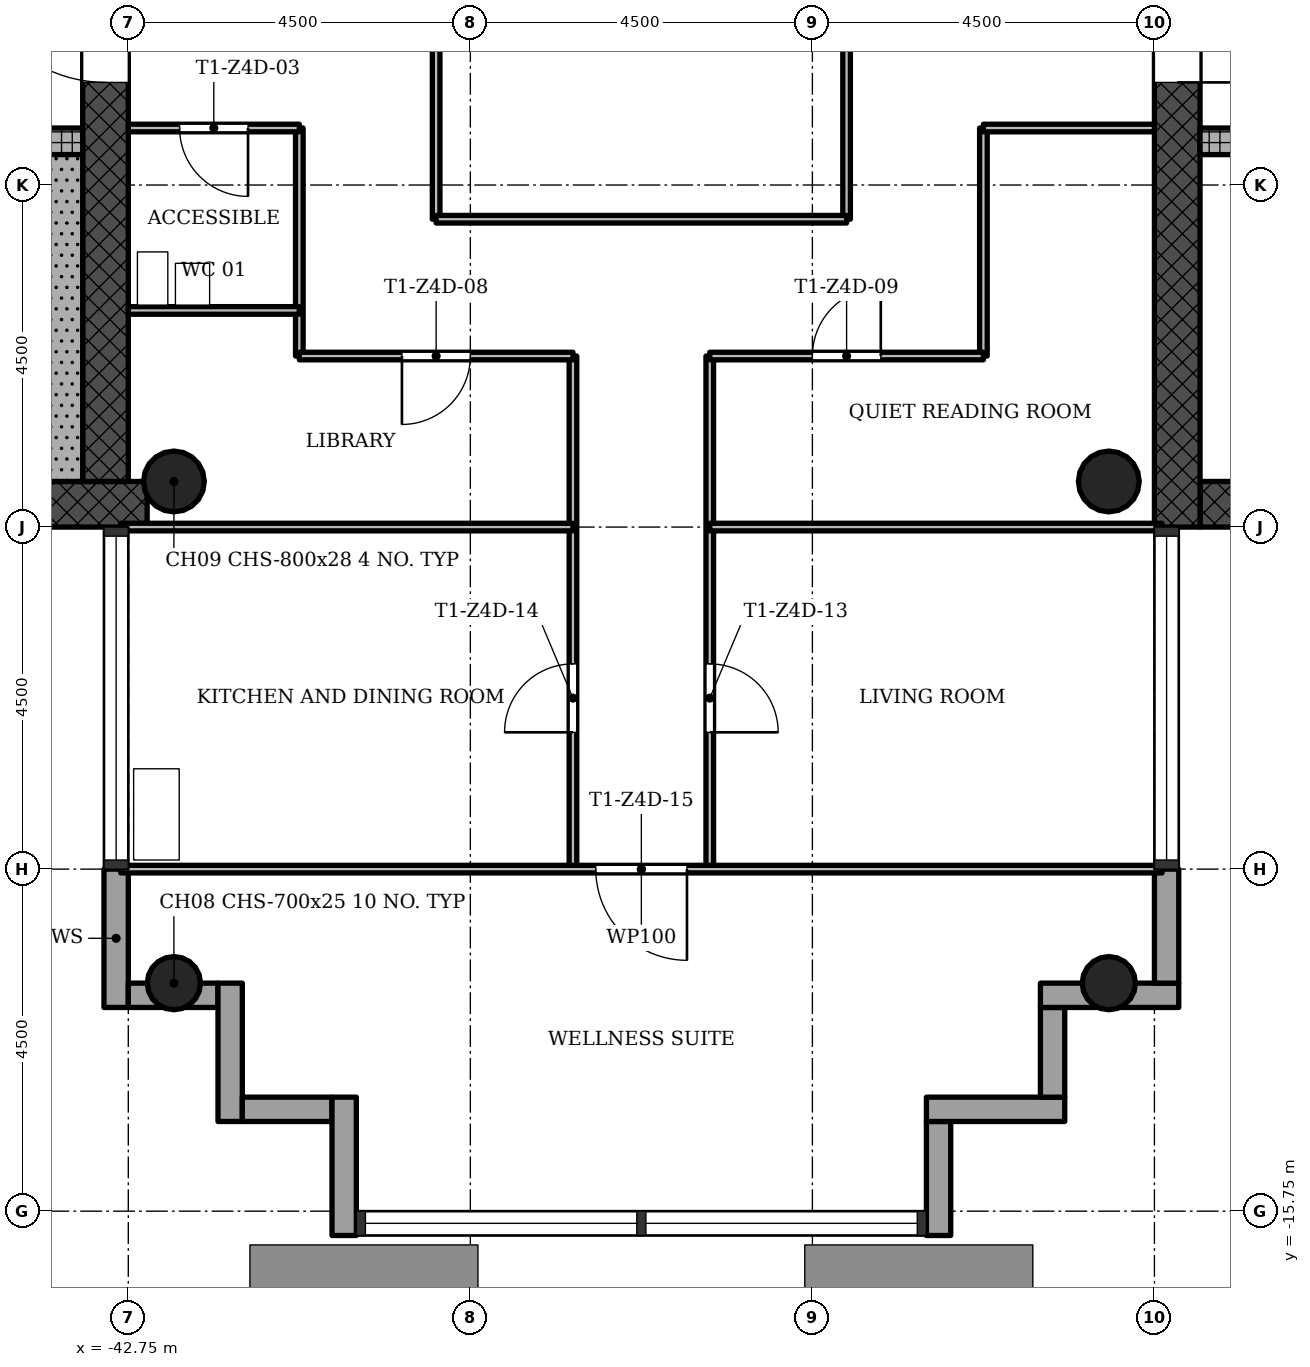
"""IFC4 building model, lengths in metres.
Left out: names, types, materials, properties, quantities, classifications, styles, units other than length and angle.
Written with IfcOpenShell. Run it as: python <this file> out.ifc"""

import sys

from ifc_helpers import new_model, si_unit, direction, frame, frame_2d, origin, origin_2d, place, context, subcontext, project, spatial, rectangle, hollow_circle, extrude, element, fill, save


model = new_model("IFC4")
c1 = context("Model", 3, precision=1e-05, world=origin(), true_north=direction((0.0, 1.0)))
c2 = subcontext(c1, "Body", "Model", "MODEL_VIEW")
j1 = project(units=[si_unit("LENGTHUNIT", "METRE"), si_unit("PLANEANGLEUNIT", "RADIAN")], contexts=[c1])
p1 = place(None, origin())
s1 = spatial("IfcSite", under=j1, at=p1, CompositionType="ELEMENT")
p2 = place(p1, origin())
s2 = spatial("IfcBuilding", under=s1, at=p2, CompositionType="ELEMENT")
p3 = place(p2, frame((0.0, 0.0, 202.8)))
s3 = spatial("IfcBuildingStorey", under=s2, at=p3, CompositionType="ELEMENT", Elevation=202.8)
p4 = place(p3, frame((-28.65, -6.45, 0.0), z_axis=(0.0, 0.0, 1.0), x_axis=(1.0, 0.0, 0.0)))
e1 = element("IfcWall", 1, at=p4, inside=s3, PredefinedType="SHEAR", context=c2, shape_type="SweptSolid", body=[
    extrude(rectangle(XDim=8.4, YDim=0.6, at=frame_2d((4.2, 0.0))), origin(), (0.0, 0.0, 1.0), 3.4),
])
p5 = place(p3, frame((-28.95, 6.15, 0.0), z_axis=(0.0, 0.0, 1.0), x_axis=(0.0, -1.0, 0.0)))
e2 = element("IfcWall", 2, at=p5, inside=s3, PredefinedType="SHEAR", context=c2, shape_type="SweptSolid", body=[
    extrude(rectangle(XDim=12.9, YDim=0.6, at=frame_2d((6.45, 0.0))), origin(), (0.0, 0.0, 1.0), 3.4),
])
p6 = place(p5, frame((5.25, 0.0, 0.0)))
e3 = element("IfcOpeningElement", 3, at=p6, cuts=e2, PredefinedType="OPENING", context=c2, shape_type="SweptSolid", body=[
    extrude(rectangle(XDim=1.8, YDim=2.1, at=frame_2d((0.9, 1.05))), frame((0.0, 0.31, 0.0), z_axis=(0.0, -1.0, 0.0), x_axis=(1.0, 0.0, 0.0)), (0.0, 0.0, 1.0), 0.62),
])
p7 = place(p3, frame((-28.65, -1.675, 0.0), z_axis=(0.0, 0.0, 1.0), x_axis=(1.0, 0.0, 0.0)))
e4 = element("IfcWall", 4, at=p7, inside=s3, PredefinedType="SHEAR", context=c2, shape_type="SweptSolid", body=[
    extrude(rectangle(XDim=7.8, YDim=0.35, at=frame_2d((3.9, 0.0))), origin(), (0.0, 0.0, 1.0), 3.4),
])
p8 = place(p7, frame((1.15, 0.0, 0.0)))
e5 = element("IfcOpeningElement", 5, at=p8, cuts=e4, PredefinedType="OPENING", context=c2, shape_type="SweptSolid", body=[
    extrude(rectangle(XDim=1.1, YDim=2.1, at=frame_2d((0.55, 1.05))), frame((0.0, 0.185, 0.0), z_axis=(0.0, -1.0, 0.0), x_axis=(1.0, 0.0, 0.0)), (0.0, 0.0, 1.0), 0.37),
])
p9 = place(p7, frame((3.35, 0.0, 0.0)))
e6 = element("IfcOpeningElement", 6, at=p9, cuts=e4, PredefinedType="OPENING", context=c2, shape_type="SweptSolid", body=[
    extrude(rectangle(XDim=1.1, YDim=2.1, at=frame_2d((0.55, 1.05))), frame((0.0, 0.185, 0.0), z_axis=(0.0, -1.0, 0.0), x_axis=(1.0, 0.0, 0.0)), (0.0, 0.0, 1.0), 0.37),
])
p10 = place(p7, frame((5.55, 0.0, 0.0)))
e7 = element("IfcOpeningElement", 7, at=p10, cuts=e4, PredefinedType="OPENING", context=c2, shape_type="SweptSolid", body=[
    extrude(rectangle(XDim=1.1, YDim=2.1, at=frame_2d((0.55, 1.05))), frame((0.0, 0.185, 0.0), z_axis=(0.0, -1.0, 0.0), x_axis=(1.0, 0.0, 0.0)), (0.0, 0.0, 1.0), 0.37),
])
p11 = place(p3, frame((-51.15, -6.45, 0.0), z_axis=(0.0, 0.0, 1.0), x_axis=(1.0, 0.0, 0.0)))
e8 = element("IfcWall", 8, at=p11, inside=s3, PredefinedType="SHEAR", context=c2, shape_type="SweptSolid", body=[
    extrude(rectangle(XDim=8.648, YDim=0.6, at=frame_2d((4.324, 0.0))), origin(), (0.0, 0.0, 1.0), 3.4),
])
p12 = place(p3, frame((-43.05, -6.15, 0.0), z_axis=(0.0, 0.0, 1.0), x_axis=(0.0, 1.0, 0.0)))
e9 = element("IfcWall", 9, at=p12, inside=s3, PredefinedType="SHEAR", context=c2, shape_type="SweptSolid", body=[
    extrude(rectangle(XDim=12.9, YDim=0.6, at=frame_2d((6.45, 0.0))), origin(), (0.0, 0.0, 1.0), 3.4),
])
p13 = place(p12, frame((5.25, 0.0, 0.0)))
e10 = element("IfcOpeningElement", 10, at=p13, cuts=e9, PredefinedType="OPENING", context=c2, shape_type="SweptSolid", body=[
    extrude(rectangle(XDim=1.8, YDim=2.1, at=frame_2d((0.9, 1.05))), frame((0.0, 0.31, 0.0), z_axis=(0.0, -1.0, 0.0), x_axis=(1.0, 0.0, 0.0)), (0.0, 0.0, 1.0), 0.62),
])
p14 = place(p3, frame((-51.15, -1.675, 0.0), z_axis=(0.0, 0.0, 1.0), x_axis=(1.0, 0.0, 0.0)))
e11 = element("IfcWall", 11, at=p14, inside=s3, PredefinedType="SHEAR", context=c2, shape_type="SweptSolid", body=[
    extrude(rectangle(XDim=7.8, YDim=0.35, at=frame_2d((3.9, 0.0))), origin(), (0.0, 0.0, 1.0), 3.4),
])
p15 = place(p14, frame((5.85, 0.0, 0.0)))
e12 = element("IfcOpeningElement", 12, at=p15, cuts=e11, PredefinedType="OPENING", context=c2, shape_type="SweptSolid", body=[
    extrude(rectangle(XDim=0.9, YDim=2.1, at=frame_2d((0.45, 1.05))), frame((0.0, 0.185, 0.0), z_axis=(0.0, -1.0, 0.0), x_axis=(1.0, 0.0, 0.0)), (0.0, 0.0, 1.0), 0.37),
])
for number, where, z_axis, x_axis in (
    (13, (-42.15, -12.75, 0.0), (0.0, 0.0, 1.0), (1.0, 0.0, 0.0)),
    (14, (-29.85, -12.75, 0.0), (0.0, 0.0, 1.0), (1.0, 0.0, 0.0)),
):
    element("IfcColumn", number, at=place(p3, frame(where, z_axis=z_axis, x_axis=x_axis)), inside=s3, PredefinedType="COLUMN", context=c2, shape_type="SweptSolid", body=[
        extrude(hollow_circle(Radius=0.35, WallThickness=0.025, at=origin_2d()), origin(), (0.0, 0.0, 1.0), 3.4),
    ])
for number, where, z_axis, x_axis in (
    (15, (-42.15, -6.15, 0.0), (0.0, 0.0, 1.0), (1.0, 0.0, 0.0)),
    (16, (-29.85, -6.15, 0.0), (0.0, 0.0, 1.0), (1.0, 0.0, 0.0)),
):
    element("IfcColumn", number, at=place(p3, frame(where, z_axis=z_axis, x_axis=x_axis)), inside=s3, PredefinedType="COLUMN", context=c2, shape_type="SweptSolid", body=[
        extrude(hollow_circle(Radius=0.4, WallThickness=0.028, at=origin_2d()), origin(), (0.0, 0.0, 1.0), 3.4),
    ])
p16 = place(p3, frame((-42.91, -11.25, -0.3), z_axis=(0.0, 0.0, 1.0), x_axis=(0.0, -1.0, 0.0)))
e17 = element("IfcWall", 17, at=p16, inside=s3, PredefinedType="STANDARD", context=c2, shape_type="SweptSolid", body=[
    extrude(rectangle(XDim=1.82, YDim=0.32, at=frame_2d((0.91, 0.0))), origin(), (0.0, 0.0, 1.0), 3.4),
])
p17 = place(p3, frame((-42.75, -12.91, -0.3), z_axis=(0.0, 0.0, 1.0), x_axis=(1.0, 0.0, 0.0)))
e18 = element("IfcWall", 18, at=p17, inside=s3, PredefinedType="STANDARD", context=c2, shape_type="SweptSolid", body=[
    extrude(rectangle(XDim=1.18, YDim=0.32, at=frame_2d((0.59, 0.0))), origin(), (0.0, 0.0, 1.0), 3.4),
])
p18 = place(p3, frame((-41.41, -12.75, -0.3), z_axis=(0.0, 0.0, 1.0), x_axis=(0.0, -1.0, 0.0)))
e19 = element("IfcWall", 19, at=p18, inside=s3, PredefinedType="STANDARD", context=c2, shape_type="SweptSolid", body=[
    extrude(rectangle(XDim=1.82, YDim=0.32, at=frame_2d((0.91, 0.0))), origin(), (0.0, 0.0, 1.0), 3.4),
])
p19 = place(p3, frame((-41.25, -14.41, -0.3), z_axis=(0.0, 0.0, 1.0), x_axis=(1.0, 0.0, 0.0)))
e20 = element("IfcWall", 20, at=p19, inside=s3, PredefinedType="STANDARD", context=c2, shape_type="SweptSolid", body=[
    extrude(rectangle(XDim=1.18, YDim=0.32, at=frame_2d((0.59, 0.0))), origin(), (0.0, 0.0, 1.0), 3.4),
])
p20 = place(p3, frame((-39.91, -14.25, -0.3), z_axis=(0.0, 0.0, 1.0), x_axis=(0.0, -1.0, 0.0)))
e21 = element("IfcWall", 21, at=p20, inside=s3, PredefinedType="STANDARD", context=c2, shape_type="SweptSolid", body=[
    extrude(rectangle(XDim=1.82, YDim=0.32, at=frame_2d((0.91, 0.0))), origin(), (0.0, 0.0, 1.0), 3.4),
])
p21 = place(p3, frame((-32.09, -16.07, -0.3), z_axis=(0.0, 0.0, 1.0), x_axis=(0.0, 1.0, 0.0)))
e22 = element("IfcWall", 22, at=p21, inside=s3, PredefinedType="STANDARD", context=c2, shape_type="SweptSolid", body=[
    extrude(rectangle(XDim=1.5, YDim=0.32, at=frame_2d((0.75, 0.0))), origin(), (0.0, 0.0, 1.0), 3.4),
])
p22 = place(p3, frame((-32.25, -14.41, -0.3), z_axis=(0.0, 0.0, 1.0), x_axis=(1.0, 0.0, 0.0)))
e23 = element("IfcWall", 23, at=p22, inside=s3, PredefinedType="STANDARD", context=c2, shape_type="SweptSolid", body=[
    extrude(rectangle(XDim=1.82, YDim=0.32, at=frame_2d((0.91, 0.0))), origin(), (0.0, 0.0, 1.0), 3.4),
])
p23 = place(p3, frame((-30.59, -14.25, -0.3), z_axis=(0.0, 0.0, 1.0), x_axis=(0.0, 1.0, 0.0)))
e24 = element("IfcWall", 24, at=p23, inside=s3, PredefinedType="STANDARD", context=c2, shape_type="SweptSolid", body=[
    extrude(rectangle(XDim=1.18, YDim=0.32, at=frame_2d((0.59, 0.0))), origin(), (0.0, 0.0, 1.0), 3.4),
])
p24 = place(p3, frame((-30.75, -12.91, -0.3), z_axis=(0.0, 0.0, 1.0), x_axis=(1.0, 0.0, 0.0)))
e25 = element("IfcWall", 25, at=p24, inside=s3, PredefinedType="STANDARD", context=c2, shape_type="SweptSolid", body=[
    extrude(rectangle(XDim=1.82, YDim=0.32, at=frame_2d((0.91, 0.0))), origin(), (0.0, 0.0, 1.0), 3.4),
])
p25 = place(p3, frame((-29.09, -12.75, -0.3), z_axis=(0.0, 0.0, 1.0), x_axis=(0.0, 1.0, 0.0)))
e26 = element("IfcWall", 26, at=p25, inside=s3, PredefinedType="STANDARD", context=c2, shape_type="SweptSolid", body=[
    extrude(rectangle(XDim=1.5, YDim=0.32, at=frame_2d((0.75, 0.0))), origin(), (0.0, 0.0, 1.0), 3.4),
])
p26 = place(p3, frame((-40.5, -4.5, 0.0), z_axis=(0.0, 0.0, 1.0), x_axis=(0.0, 1.0, 0.0)))
e27 = element("IfcWall", 27, at=p26, inside=s3, PredefinedType="PARTITIONING", context=c2, shape_type="SweptSolid", body=[
    extrude(rectangle(XDim=3.0, YDim=0.1, at=frame_2d((1.5, 0.0))), origin(), (0.0, 0.0, 1.0), 3.0),
])
p27 = place(p3, frame((-38.7, -2.7, 0.0), z_axis=(0.0, 0.0, 1.0), x_axis=(0.0, 1.0, 0.0)))
e28 = element("IfcWall", 28, at=p27, inside=s3, PredefinedType="PARTITIONING", context=c2, shape_type="SweptSolid", body=[
    extrude(rectangle(XDim=5.4, YDim=0.1, at=frame_2d((2.7, 0.0))), origin(), (0.0, 0.0, 1.0), 3.0),
])
p28 = place(p3, frame((-36.9, -11.25, 0.0), z_axis=(0.0, 0.0, 1.0), x_axis=(0.0, 1.0, 0.0)))
e29 = element("IfcWall", 29, at=p28, inside=s3, PredefinedType="PARTITIONING", context=c2, shape_type="SweptSolid", body=[
    extrude(rectangle(XDim=6.75, YDim=0.1, at=frame_2d((3.375, 0.0))), origin(), (0.0, 0.0, 1.0), 3.0),
])
p29 = place(p28, frame((1.8, 0.0, 0.0)))
e30 = element("IfcOpeningElement", 30, at=p29, cuts=e29, PredefinedType="OPENING", context=c2, shape_type="SweptSolid", body=[
    extrude(rectangle(XDim=0.9, YDim=2.1, at=frame_2d((0.45, 1.05))), frame((0.0, 0.06, 0.0), z_axis=(0.0, -1.0, 0.0), x_axis=(1.0, 0.0, 0.0)), (0.0, 0.0, 1.0), 0.12),
])
p30 = place(p3, frame((-35.1, -11.25, 0.0), z_axis=(0.0, 0.0, 1.0), x_axis=(0.0, 1.0, 0.0)))
e31 = element("IfcWall", 31, at=p30, inside=s3, PredefinedType="PARTITIONING", context=c2, shape_type="SweptSolid", body=[
    extrude(rectangle(XDim=6.75, YDim=0.1, at=frame_2d((3.375, 0.0))), origin(), (0.0, 0.0, 1.0), 3.0),
])
p31 = place(p30, frame((1.8, 0.0, 0.0)))
e32 = element("IfcOpeningElement", 32, at=p31, cuts=e31, PredefinedType="OPENING", context=c2, shape_type="SweptSolid", body=[
    extrude(rectangle(XDim=0.9, YDim=2.1, at=frame_2d((0.45, 1.05))), frame((0.0, 0.06, 0.0), z_axis=(0.0, -1.0, 0.0), x_axis=(1.0, 0.0, 0.0)), (0.0, 0.0, 1.0), 0.12),
])
p32 = place(p3, frame((-33.3, -2.7, 0.0), z_axis=(0.0, 0.0, 1.0), x_axis=(0.0, 1.0, 0.0)))
e33 = element("IfcWall", 33, at=p32, inside=s3, PredefinedType="PARTITIONING", context=c2, shape_type="SweptSolid", body=[
    extrude(rectangle(XDim=5.4, YDim=0.1, at=frame_2d((2.7, 0.0))), origin(), (0.0, 0.0, 1.0), 3.0),
])
p33 = place(p32, frame((2.25, 0.0, 0.0)))
e34 = element("IfcOpeningElement", 34, at=p33, cuts=e33, PredefinedType="OPENING", context=c2, shape_type="SweptSolid", body=[
    extrude(rectangle(XDim=0.9, YDim=2.1, at=frame_2d((0.45, 1.05))), frame((0.0, 0.06, 0.0), z_axis=(0.0, -1.0, 0.0), x_axis=(1.0, 0.0, 0.0)), (0.0, 0.0, 1.0), 0.12),
])
p34 = place(p3, frame((-31.5, -4.5, 0.0), z_axis=(0.0, 0.0, 1.0), x_axis=(0.0, 1.0, 0.0)))
e35 = element("IfcWall", 35, at=p34, inside=s3, PredefinedType="PARTITIONING", context=c2, shape_type="SweptSolid", body=[
    extrude(rectangle(XDim=3.0, YDim=0.1, at=frame_2d((1.5, 0.0))), origin(), (0.0, 0.0, 1.0), 3.0),
])
p35 = place(p3, frame((-42.85, -11.25, 0.0), z_axis=(0.0, 0.0, 1.0), x_axis=(1.0, 0.0, 0.0)))
e36 = element("IfcWall", 36, at=p35, inside=s3, PredefinedType="PARTITIONING", context=c2, shape_type="SweptSolid", body=[
    extrude(rectangle(XDim=13.7, YDim=0.1, at=frame_2d((6.85, 0.0))), origin(), (0.0, 0.0, 1.0), 3.0),
])
p36 = place(p35, frame((6.25, 0.0, 0.0)))
e37 = element("IfcOpeningElement", 37, at=p36, cuts=e36, PredefinedType="OPENING", context=c2, shape_type="SweptSolid", body=[
    extrude(rectangle(XDim=1.2, YDim=2.1, at=frame_2d((0.6, 1.05))), frame((0.0, 0.06, 0.0), z_axis=(0.0, -1.0, 0.0), x_axis=(1.0, 0.0, 0.0)), (0.0, 0.0, 1.0), 0.12),
])
for number, where, z_axis, x_axis in (
    (38, (-42.85, -6.75, 0.0), (0.0, 0.0, 1.0), (1.0, 0.0, 0.0)),
    (39, (-35.1, -6.75, 0.0), (0.0, 0.0, 1.0), (1.0, 0.0, 0.0)),
):
    element("IfcWall", number, at=place(p3, frame(where, z_axis=z_axis, x_axis=x_axis)), inside=s3, PredefinedType="PARTITIONING", context=c2, shape_type="SweptSolid", body=[
        extrude(rectangle(XDim=5.95, YDim=0.1, at=frame_2d((2.975, 0.0))), origin(), (0.0, 0.0, 1.0), 3.0),
    ])
p37 = place(p3, frame((-40.5, -4.5, 0.0), z_axis=(0.0, 0.0, 1.0), x_axis=(1.0, 0.0, 0.0)))
e40 = element("IfcWall", 40, at=p37, inside=s3, PredefinedType="PARTITIONING", context=c2, shape_type="SweptSolid", body=[
    extrude(rectangle(XDim=3.6, YDim=0.1, at=frame_2d((1.8, 0.0))), origin(), (0.0, 0.0, 1.0), 3.0),
])
p38 = place(p37, frame((1.35, 0.0, 0.0)))
e41 = element("IfcOpeningElement", 41, at=p38, cuts=e40, PredefinedType="OPENING", context=c2, shape_type="SweptSolid", body=[
    extrude(rectangle(XDim=0.9, YDim=2.1, at=frame_2d((0.45, 1.05))), frame((0.0, 0.06, 0.0), z_axis=(0.0, -1.0, 0.0), x_axis=(1.0, 0.0, 0.0)), (0.0, 0.0, 1.0), 0.12),
])
p39 = place(p3, frame((-35.1, -4.5, 0.0), z_axis=(0.0, 0.0, 1.0), x_axis=(1.0, 0.0, 0.0)))
e42 = element("IfcWall", 42, at=p39, inside=s3, PredefinedType="PARTITIONING", context=c2, shape_type="SweptSolid", body=[
    extrude(rectangle(XDim=3.6, YDim=0.1, at=frame_2d((1.8, 0.0))), origin(), (0.0, 0.0, 1.0), 3.0),
])
p40 = place(p39, frame((1.35, 0.0, 0.0)))
e43 = element("IfcOpeningElement", 43, at=p40, cuts=e42, PredefinedType="OPENING", context=c2, shape_type="SweptSolid", body=[
    extrude(rectangle(XDim=0.9, YDim=2.1, at=frame_2d((0.45, 1.05))), frame((0.0, 0.06, 0.0), z_axis=(0.0, -1.0, 0.0), x_axis=(1.0, 0.0, 0.0)), (0.0, 0.0, 1.0), 0.12),
])
p41 = place(p3, frame((-42.75, -3.9, 0.0), z_axis=(0.0, 0.0, 1.0), x_axis=(1.0, 0.0, 0.0)))
e44 = element("IfcWall", 44, at=p41, inside=s3, PredefinedType="PARTITIONING", context=c2, shape_type="SweptSolid", body=[
    extrude(rectangle(XDim=2.25, YDim=0.1, at=frame_2d((1.125, 0.0))), origin(), (0.0, 0.0, 1.0), 3.0),
])
p42 = place(p3, frame((-38.7, -2.7, 0.0), z_axis=(0.0, 0.0, 1.0), x_axis=(1.0, 0.0, 0.0)))
e45 = element("IfcWall", 45, at=p42, inside=s3, PredefinedType="PARTITIONING", context=c2, shape_type="SweptSolid", body=[
    extrude(rectangle(XDim=5.4, YDim=0.1, at=frame_2d((2.7, 0.0))), origin(), (0.0, 0.0, 1.0), 3.0),
])
p43 = place(p3, frame((-42.75, -1.5, 0.0), z_axis=(0.0, 0.0, 1.0), x_axis=(1.0, 0.0, 0.0)))
e46 = element("IfcWall", 46, at=p43, inside=s3, PredefinedType="PARTITIONING", context=c2, shape_type="SweptSolid", body=[
    extrude(rectangle(XDim=2.25, YDim=0.1, at=frame_2d((1.125, 0.0))), origin(), (0.0, 0.0, 1.0), 3.0),
])
p44 = place(p43, frame((0.675, 0.0, 0.0)))
e47 = element("IfcOpeningElement", 47, at=p44, cuts=e46, PredefinedType="OPENING", context=c2, shape_type="SweptSolid", body=[
    extrude(rectangle(XDim=0.9, YDim=2.1, at=frame_2d((0.45, 1.05))), frame((0.0, 0.06, 0.0), z_axis=(0.0, -1.0, 0.0), x_axis=(1.0, 0.0, 0.0)), (0.0, 0.0, 1.0), 0.12),
])
p45 = place(p3, frame((-31.5, -1.5, 0.0), z_axis=(0.0, 0.0, 1.0), x_axis=(1.0, 0.0, 0.0)))
e48 = element("IfcWall", 48, at=p45, inside=s3, PredefinedType="PARTITIONING", context=c2, shape_type="SweptSolid", body=[
    extrude(rectangle(XDim=2.25, YDim=0.1, at=frame_2d((1.125, 0.0))), origin(), (0.0, 0.0, 1.0), 3.0),
])
p46 = place(p3, frame((-43.65, -1.85, 0.0), z_axis=(0.0, 0.0, 1.0), x_axis=(0.0, -1.0, 0.0)))
e49 = element("IfcWall", 49, at=p46, inside=s3, PredefinedType="SHEAR", context=c2, shape_type="SweptSolid", body=[
    extrude(rectangle(XDim=4.3, YDim=0.6, at=frame_2d((2.15, 0.0))), origin(), (0.0, 0.0, 1.0), 3.4),
])
p47 = place(p44, origin())
e50 = element("IfcDoor", 50, at=p47, inside=s3, OperationType="SINGLE_SWING_RIGHT", PredefinedType="DOOR", context=c2, shape_type="SweptSolid", body=[
    extrude(rectangle(XDim=0.9, YDim=2.1, at=frame_2d((0.45, 1.05))), frame((0.0, 0.025, 0.0), z_axis=(0.0, -1.0, 0.0), x_axis=(1.0, 0.0, 0.0)), (0.0, 0.0, 1.0), 0.05),
])
fill(e47, e50)
p48 = place(p38, origin())
e51 = element("IfcDoor", 51, at=p48, inside=s3, OperationType="SINGLE_SWING_LEFT", PredefinedType="DOOR", context=c2, shape_type="SweptSolid", body=[
    extrude(rectangle(XDim=0.9, YDim=2.1, at=frame_2d((0.45, 1.05))), frame((0.0, 0.025, 0.0), z_axis=(0.0, -1.0, 0.0), x_axis=(1.0, 0.0, 0.0)), (0.0, 0.0, 1.0), 0.05),
])
fill(e41, e51)
p49 = place(p40, origin())
e52 = element("IfcDoor", 52, at=p49, inside=s3, OperationType="SINGLE_SWING_LEFT", PredefinedType="DOOR", context=c2, shape_type="SweptSolid", body=[
    extrude(rectangle(XDim=0.9, YDim=2.1, at=frame_2d((0.45, 1.05))), frame((0.0, 0.025, 0.0), z_axis=(0.0, -1.0, 0.0), x_axis=(1.0, 0.0, 0.0)), (0.0, 0.0, 1.0), 0.05),
])
fill(e43, e52)
p50 = place(p31, origin())
e53 = element("IfcDoor", 53, at=p50, inside=s3, OperationType="SINGLE_SWING_LEFT", PredefinedType="DOOR", context=c2, shape_type="SweptSolid", body=[
    extrude(rectangle(XDim=0.9, YDim=2.1, at=frame_2d((0.45, 1.05))), frame((0.0, 0.025, 0.0), z_axis=(0.0, -1.0, 0.0), x_axis=(1.0, 0.0, 0.0)), (0.0, 0.0, 1.0), 0.05),
])
fill(e32, e53)
p51 = place(p29, origin())
e54 = element("IfcDoor", 54, at=p51, inside=s3, OperationType="SINGLE_SWING_RIGHT", PredefinedType="DOOR", context=c2, shape_type="SweptSolid", body=[
    extrude(rectangle(XDim=0.9, YDim=2.1, at=frame_2d((0.45, 1.05))), frame((0.0, 0.025, 0.0), z_axis=(0.0, -1.0, 0.0), x_axis=(1.0, 0.0, 0.0)), (0.0, 0.0, 1.0), 0.05),
])
fill(e30, e54)
p52 = place(p36, origin())
e55 = element("IfcDoor", 55, at=p52, inside=s3, OperationType="SINGLE_SWING_RIGHT", PredefinedType="DOOR", context=c2, shape_type="SweptSolid", body=[
    extrude(rectangle(XDim=1.2, YDim=2.1, at=frame_2d((0.6, 1.05))), frame((0.0, 0.025, 0.0), z_axis=(0.0, -1.0, 0.0), x_axis=(1.0, 0.0, 0.0)), (0.0, 0.0, 1.0), 0.05),
])
fill(e37, e55)
p53 = place(p6, origin())
e56 = element("IfcDoor", 56, at=p53, inside=s3, OperationType="SINGLE_SWING_LEFT", PredefinedType="DOOR", context=c2, shape_type="SweptSolid", body=[
    extrude(rectangle(XDim=1.8, YDim=2.1, at=frame_2d((0.9, 1.05))), frame((0.0, 0.025, 0.0), z_axis=(0.0, -1.0, 0.0), x_axis=(1.0, 0.0, 0.0)), (0.0, 0.0, 1.0), 0.05),
])
fill(e3, e56)
p54 = place(p13, origin())
e57 = element("IfcDoor", 57, at=p54, inside=s3, OperationType="SINGLE_SWING_LEFT", PredefinedType="DOOR", context=c2, shape_type="SweptSolid", body=[
    extrude(rectangle(XDim=1.8, YDim=2.1, at=frame_2d((0.9, 1.05))), frame((0.0, 0.025, 0.0), z_axis=(0.0, -1.0, 0.0), x_axis=(1.0, 0.0, 0.0)), (0.0, 0.0, 1.0), 0.05),
])
fill(e10, e57)
save(model, sys.argv[1])
